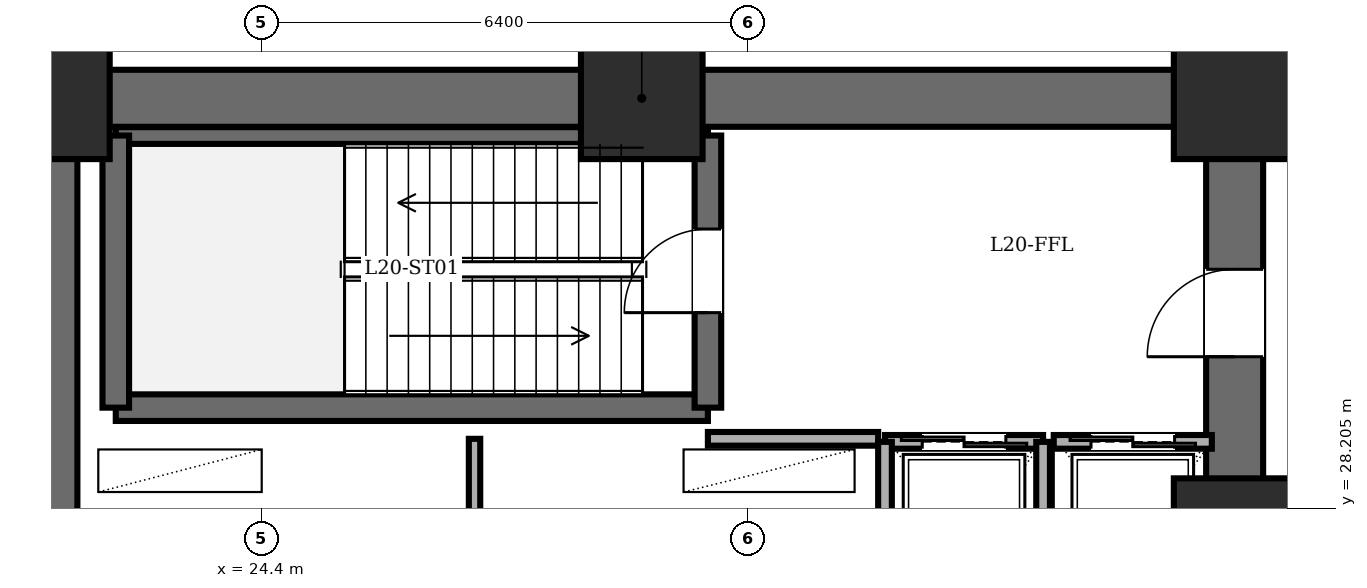
"""IFC4 building model, lengths in metres.
Left out: names, types, materials, properties, quantities, classifications, styles, units other than length and angle.
Written with IfcOpenShell. Run it as: python <this file> out.ifc"""

import sys

from ifc_helpers import new_model, si_unit, direction, frame, frame_2d, origin, origin_2d, place, context, subcontext, project, spatial, rectangle, extrude, element, fill, save


model = new_model("IFC4")
c1 = context("Model", 3, precision=1e-05, world=origin(), true_north=direction((0.0, 1.0)))
c2 = subcontext(c1, "Body", "Model", "MODEL_VIEW")
j1 = project(units=[si_unit("LENGTHUNIT", "METRE"), si_unit("PLANEANGLEUNIT", "RADIAN")], contexts=[c1])
p1 = place(None, origin())
s1 = spatial("IfcSite", under=j1, at=p1, CompositionType="ELEMENT")
p2 = place(p1, origin())
s2 = spatial("IfcBuilding", under=s1, at=p2, CompositionType="ELEMENT")
p3 = place(p2, frame((0.0, 0.0, 75.6)))
s3 = spatial("IfcBuildingStorey", under=s2, at=p3, CompositionType="ELEMENT", Elevation=75.6)
for number, where, z_axis, x_axis in (
    (1, (37.2, 27.8, 0.0), (0.0, 0.0, 1.0), (1.0, 0.0, 0.0)),
    (2, (37.2, 33.6, 0.0), (0.0, 0.0, 1.0), (1.0, 0.0, 0.0)),
    (3, (29.4, 33.6, 0.0), (0.0, 0.0, 1.0), (1.0, 0.0, 0.0)),
    (4, (21.6, 33.6, 0.0), (0.0, 0.0, 1.0), (1.0, 0.0, 0.0)),
):
    element("IfcColumn", number, at=place(p3, frame(where, z_axis=z_axis, x_axis=x_axis)), inside=s3, PredefinedType="COLUMN", context=c2, shape_type="SweptSolid", body=[
        extrude(rectangle(XDim=1.6, YDim=1.6, at=origin_2d()), origin(), (0.0, 0.0, 1.0), 5.6),
    ])
p4 = place(p3, frame((21.6, 14.4, 0.0), z_axis=(0.0, 0.0, 1.0), x_axis=(0.0, 1.0, 0.0)))
e5 = element("IfcWall", 5, at=p4, inside=s3, PredefinedType="SHEAR", context=c2, shape_type="SweptSolid", body=[
    extrude(rectangle(XDim=19.2, YDim=0.75, at=frame_2d((9.6, 0.0))), origin(), (0.0, 0.0, 1.0), 5.36),
])
p5 = place(p3, frame((21.6, 33.6, 0.0), z_axis=(0.0, 0.0, 1.0), x_axis=(1.0, 0.0, 0.0)))
e6 = element("IfcWall", 6, at=p5, inside=s3, PredefinedType="SHEAR", context=c2, shape_type="SweptSolid", body=[
    extrude(rectangle(XDim=15.6, YDim=0.75, at=frame_2d((7.8, 0.0))), origin(), (0.0, 0.0, 1.0), 5.36),
])
p6 = place(p3, frame((37.2, 14.4, 0.0), z_axis=(0.0, 0.0, 1.0), x_axis=(0.0, 1.0, 0.0)))
e7 = element("IfcWall", 7, at=p6, inside=s3, PredefinedType="SHEAR", context=c2, shape_type="SweptSolid", body=[
    extrude(rectangle(XDim=19.2, YDim=0.75, at=frame_2d((9.6, 0.0))), origin(), (0.0, 0.0, 1.0), 5.36),
])
p7 = place(p6, frame((15.8, 0.0, 0.0)))
e8 = element("IfcOpeningElement", 8, at=p7, cuts=e7, PredefinedType="OPENING", context=c2, shape_type="SweptSolid", body=[
    extrude(rectangle(XDim=1.15, YDim=2.15, at=frame_2d((0.575, 1.075))), frame((0.0, 0.385, 0.0), z_axis=(0.0, -1.0, 0.0), x_axis=(1.0, 0.0, 0.0)), (0.0, 0.0, 1.0), 0.77),
])
p8 = place(p6, frame((3.6, 0.0, 0.0)))
e9 = element("IfcOpeningElement", 9, at=p8, cuts=e7, PredefinedType="OPENING", context=c2, shape_type="SweptSolid", body=[
    extrude(rectangle(XDim=1.1, YDim=2.15, at=frame_2d((0.55, 1.075))), frame((0.0, 0.385, 0.0), z_axis=(0.0, -1.0, 0.0), x_axis=(1.0, 0.0, 0.0)), (0.0, 0.0, 1.0), 0.77),
])
p9 = place(p6, frame((8.6, 0.0, 0.0)))
e10 = element("IfcOpeningElement", 10, at=p9, cuts=e7, PredefinedType="OPENING", context=c2, shape_type="SweptSolid", body=[
    extrude(rectangle(XDim=1.3, YDim=2.2, at=frame_2d((0.65, 1.1))), frame((0.0, 0.385, 0.0), z_axis=(0.0, -1.0, 0.0), x_axis=(1.0, 0.0, 0.0)), (0.0, 0.0, 1.0), 0.77),
])
p10 = place(p3, frame((22.48, 29.53, 0.0), z_axis=(0.0, 0.0, 1.0), x_axis=(1.0, 0.0, 0.0)))
e11 = element("IfcWall", 11, at=p10, inside=s3, PredefinedType="SOLIDWALL", context=c2, shape_type="SweptSolid", body=[
    extrude(rectangle(XDim=7.79, YDim=0.35, at=frame_2d((3.895, 0.0))), origin(), (0.0, 0.0, 1.0), 5.36),
])
p11 = place(p3, frame((22.48, 33.11, 0.0), z_axis=(0.0, 0.0, 1.0), x_axis=(1.0, 0.0, 0.0)))
e12 = element("IfcWall", 12, at=p11, inside=s3, PredefinedType="PARTITIONING", context=c2, shape_type="SweptSolid", body=[
    extrude(rectangle(XDim=7.79, YDim=0.22, at=frame_2d((3.895, 0.0))), origin(), (0.0, 0.0, 1.0), 5.36),
])
p12 = place(p3, frame((22.48, 29.53, 0.0), z_axis=(0.0, 0.0, 1.0), x_axis=(0.0, 1.0, 0.0)))
e13 = element("IfcWall", 13, at=p12, inside=s3, PredefinedType="SOLIDWALL", context=c2, shape_type="SweptSolid", body=[
    extrude(rectangle(XDim=3.58, YDim=0.35, at=frame_2d((1.79, 0.0))), origin(), (0.0, 0.0, 1.0), 5.36),
])
p13 = place(p3, frame((30.27, 29.53, 0.0), z_axis=(0.0, 0.0, 1.0), x_axis=(0.0, 1.0, 0.0)))
e14 = element("IfcWall", 14, at=p13, inside=s3, PredefinedType="SOLIDWALL", context=c2, shape_type="SweptSolid", body=[
    extrude(rectangle(XDim=3.58, YDim=0.35, at=frame_2d((1.79, 0.0))), origin(), (0.0, 0.0, 1.0), 5.36),
])
p14 = place(p13, frame((1.25, 0.0, 0.0)))
e15 = element("IfcOpeningElement", 15, at=p14, cuts=e14, PredefinedType="OPENING", context=c2, shape_type="SweptSolid", body=[
    extrude(rectangle(XDim=1.1, YDim=2.15, at=frame_2d((0.55, 1.075))), frame((0.0, 0.185, 0.0), z_axis=(0.0, -1.0, 0.0), x_axis=(1.0, 0.0, 0.0)), (0.0, 0.0, 1.0), 0.37),
])
p15 = place(p3, frame((30.27, 29.12, 0.0), z_axis=(0.0, 0.0, 1.0), x_axis=(1.0, 0.0, 0.0)))
e16 = element("IfcWall", 16, at=p15, inside=s3, PredefinedType="PARTITIONING", context=c2, shape_type="SweptSolid", body=[
    extrude(rectangle(XDim=2.24, YDim=0.18, at=frame_2d((1.12, 0.0))), origin(), (0.0, 0.0, 1.0), 5.36),
])
p16 = place(p3, frame((27.2, 27.6, 0.0), z_axis=(0.0, 0.0, 1.0), x_axis=(0.0, 1.0, 0.0)))
e17 = element("IfcWall", 17, at=p16, inside=s3, PredefinedType="PARTITIONING", context=c2, shape_type="SweptSolid", body=[
    extrude(rectangle(XDim=1.52, YDim=0.15, at=frame_2d((0.76, 0.0))), origin(), (0.0, 0.0, 1.0), 5.36),
])
p17 = place(p3, frame((32.6, 29.08, 0.0), z_axis=(0.0, 0.0, 1.0), x_axis=(1.0, 0.0, 0.0)))
e18 = element("IfcWall", 18, at=p17, inside=s3, PredefinedType="PARTITIONING", context=c2, shape_type="SweptSolid", body=[
    extrude(rectangle(XDim=2.08, YDim=0.18, at=frame_2d((1.04, 0.0))), origin(), (0.0, 0.0, 1.0), 5.36),
])
p18 = place(p17, frame((0.49, 0.0, 0.0)))
e19 = element("IfcOpeningElement", 19, at=p18, cuts=e18, PredefinedType="OPENING", context=c2, shape_type="SweptSolid", body=[
    extrude(rectangle(XDim=1.1, YDim=2.2, at=frame_2d((0.55, 1.1))), frame((0.0, 0.1, 0.0), z_axis=(0.0, -1.0, 0.0), x_axis=(1.0, 0.0, 0.0)), (0.0, 0.0, 1.0), 0.2),
])
for number, where, z_axis, x_axis in (
    (20, (34.68, 26.35, 0.0), (0.0, 0.0, 1.0), (0.0, 1.0, 0.0)),
    (21, (32.6, 29.08, 0.0), (0.0, 0.0, 1.0), (0.0, -1.0, 0.0)),
):
    element("IfcWall", number, at=place(p3, frame(where, z_axis=z_axis, x_axis=x_axis)), inside=s3, PredefinedType="PARTITIONING", context=c2, shape_type="SweptSolid", body=[
        extrude(rectangle(XDim=2.73, YDim=0.18, at=frame_2d((1.365, 0.0))), origin(), (0.0, 0.0, 1.0), 5.36),
    ])
p19 = place(p3, frame((34.82, 29.08, 0.0), z_axis=(0.0, 0.0, 1.0), x_axis=(1.0, 0.0, 0.0)))
e22 = element("IfcWall", 22, at=p19, inside=s3, PredefinedType="PARTITIONING", context=c2, shape_type="SweptSolid", body=[
    extrude(rectangle(XDim=2.08, YDim=0.18, at=frame_2d((1.04, 0.0))), origin(), (0.0, 0.0, 1.0), 5.36),
])
p20 = place(p19, frame((0.49, 0.0, 0.0)))
e23 = element("IfcOpeningElement", 23, at=p20, cuts=e22, PredefinedType="OPENING", context=c2, shape_type="SweptSolid", body=[
    extrude(rectangle(XDim=1.1, YDim=2.2, at=frame_2d((0.55, 1.1))), frame((0.0, 0.1, 0.0), z_axis=(0.0, -1.0, 0.0), x_axis=(1.0, 0.0, 0.0)), (0.0, 0.0, 1.0), 0.2),
])
p21 = place(p14, origin())
e24 = element("IfcDoor", 24, at=p21, inside=s3, OperationType="SINGLE_SWING_LEFT", PredefinedType="DOOR", context=c2, shape_type="SweptSolid", body=[
    extrude(rectangle(XDim=1.1, YDim=2.15, at=frame_2d((0.55, 1.075))), frame((0.0, 0.025, 0.0), z_axis=(0.0, -1.0, 0.0), x_axis=(1.0, 0.0, 0.0)), (0.0, 0.0, 1.0), 0.05),
])
fill(e15, e24)
p22 = place(p7, origin())
e25 = element("IfcDoor", 25, at=p22, inside=s3, OperationType="SINGLE_SWING_LEFT", PredefinedType="DOOR", context=c2, shape_type="SweptSolid", body=[
    extrude(rectangle(XDim=1.15, YDim=2.15, at=frame_2d((0.575, 1.075))), frame((0.0, 0.025, 0.0), z_axis=(0.0, -1.0, 0.0), x_axis=(1.0, 0.0, 0.0)), (0.0, 0.0, 1.0), 0.05),
])
fill(e8, e25)
p23 = place(p18, origin())
e26 = element("IfcDoor", 26, at=p23, inside=s3, OperationType="DOUBLE_DOOR_SLIDING", PredefinedType="DOOR", context=c2, shape_type="SweptSolid", body=[
    extrude(rectangle(XDim=1.1, YDim=2.2, at=frame_2d((0.55, 1.1))), frame((0.0, 0.025, 0.0), z_axis=(0.0, -1.0, 0.0), x_axis=(1.0, 0.0, 0.0)), (0.0, 0.0, 1.0), 0.05),
])
fill(e19, e26)
p24 = place(p20, origin())
e27 = element("IfcDoor", 27, at=p24, inside=s3, OperationType="DOUBLE_DOOR_SLIDING", PredefinedType="DOOR", context=c2, shape_type="SweptSolid", body=[
    extrude(rectangle(XDim=1.1, YDim=2.2, at=frame_2d((0.55, 1.1))), frame((0.0, 0.025, 0.0), z_axis=(0.0, -1.0, 0.0), x_axis=(1.0, 0.0, 0.0)), (0.0, 0.0, 1.0), 0.05),
])
fill(e23, e27)
save(model, sys.argv[1])
